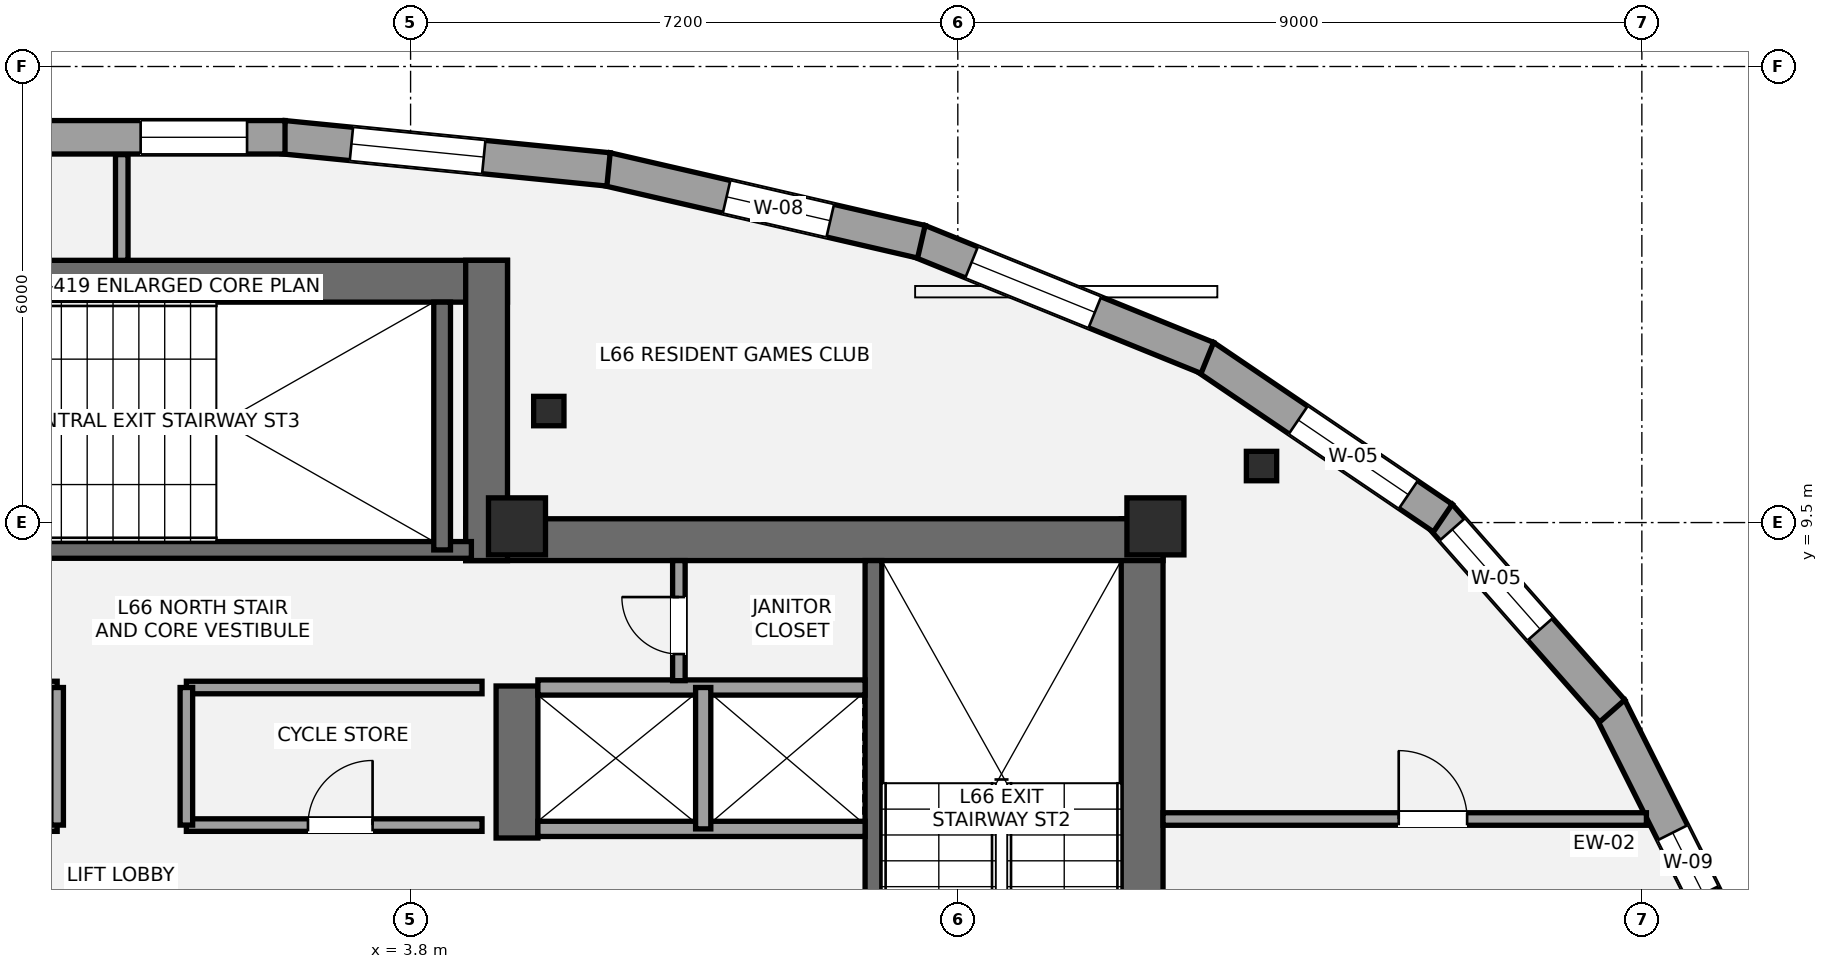
"""IFC4 building model, lengths in metres.
Left out: names, types, materials, properties, quantities, classifications, styles, units other than length and angle.
Written with IfcOpenShell. Run it as: python <this file> out.ifc"""

import sys

from ifc_helpers import new_model, si_unit, direction, frame, frame_2d, origin, origin_2d, place, context, subcontext, project, spatial, rectangle, i_section, extrude, element, fill, save


model = new_model("IFC4")
c1 = context("Model", 3, precision=1e-05, world=origin(), true_north=direction((0.0, 1.0)))
c2 = subcontext(c1, "Body", "Model", "MODEL_VIEW")
j1 = project(units=[si_unit("LENGTHUNIT", "METRE"), si_unit("PLANEANGLEUNIT", "RADIAN")], contexts=[c1])
p1 = place(None, origin())
s1 = spatial("IfcSite", under=j1, at=p1, CompositionType="ELEMENT")
p2 = place(p1, origin())
s2 = spatial("IfcBuilding", under=s1, at=p2, CompositionType="ELEMENT")
p3 = place(p2, frame((0.0, 0.0, 235.2)))
s3 = spatial("IfcBuildingStorey", under=s2, at=p3, CompositionType="ELEMENT", Elevation=235.2)
p4 = place(p3, frame((13.425, 1.3, 0.0), z_axis=(0.0, 0.0, 1.0), x_axis=(0.0, 1.0, 0.0)))
e1 = element("IfcWall", 1, at=p4, inside=s3, PredefinedType="SHEAR", context=c2, shape_type="SweptSolid", body=[
    extrude(rectangle(XDim=8.25, YDim=0.55, at=frame_2d((4.125, 0.0))), origin(), (0.0, 0.0, 1.0), 3.15),
])
p5 = place(p3, frame((4.525, 9.275, 0.0), z_axis=(0.0, 0.0, 1.0), x_axis=(1.0, 0.0, 0.0)))
e2 = element("IfcWall", 2, at=p5, inside=s3, PredefinedType="SHEAR", context=c2, shape_type="SweptSolid", body=[
    extrude(rectangle(XDim=9.175, YDim=0.55, at=frame_2d((4.587, 0.0))), origin(), (0.0, 0.0, 1.0), 3.15),
])
p6 = place(p3, frame((5.2, 5.35, 0.0), z_axis=(0.0, 0.0, 1.0), x_axis=(0.0, 1.0, 0.0)))
e3 = element("IfcWall", 3, at=p6, inside=s3, PredefinedType="SHEAR", context=c2, shape_type="SweptSolid", body=[
    extrude(rectangle(XDim=2.0, YDim=0.55, at=frame_2d((1.0, 0.0))), origin(), (0.0, 0.0, 1.0), 3.15),
])
p7 = place(p3, frame((9.89, 1.85, 0.0), z_axis=(0.0, 0.0, 1.0), x_axis=(0.0, 1.0, 0.0)))
e4 = element("IfcWall", 4, at=p7, inside=s3, PredefinedType="SHEAR", context=c2, shape_type="SweptSolid", body=[
    extrude(rectangle(XDim=7.15, YDim=0.22, at=frame_2d((3.575, 0.0))), origin(), (0.0, 0.0, 1.0), 3.15),
])
p8 = place(p3, frame((-5.075, 12.675, 0.0), z_axis=(0.0, 0.0, 1.0), x_axis=(1.0, 0.0, 0.0)))
e5 = element("IfcWall", 5, at=p8, inside=s3, PredefinedType="SHEAR", context=c2, shape_type="SweptSolid", body=[
    extrude(rectangle(XDim=10.15, YDim=0.55, at=frame_2d((5.075, 0.0))), origin(), (0.0, 0.0, 1.0), 3.15),
])
p9 = place(p3, frame((4.8, 9.0, 0.0), z_axis=(0.0, 0.0, 1.0), x_axis=(0.0, 1.0, 0.0)))
e6 = element("IfcWall", 6, at=p9, inside=s3, PredefinedType="SHEAR", context=c2, shape_type="SweptSolid", body=[
    extrude(rectangle(XDim=3.95, YDim=0.55, at=frame_2d((1.975, 0.0))), origin(), (0.0, 0.0, 1.0), 3.15),
])
p10 = place(p3, frame((-4.7, 9.14, 0.0), z_axis=(0.0, 0.0, 1.0), x_axis=(1.0, 0.0, 0.0)))
e7 = element("IfcWall", 7, at=p10, inside=s3, PredefinedType="SHEAR", context=c2, shape_type="SweptSolid", body=[
    extrude(rectangle(XDim=9.3, YDim=0.22, at=frame_2d((4.65, 0.0))), origin(), (0.0, 0.0, 1.0), 3.15),
])
p11 = place(p10, frame((1.15, 0.0, 0.0)))
e8 = element("IfcOpeningElement", 8, at=p11, cuts=e7, PredefinedType="OPENING", context=c2, shape_type="SweptSolid", body=[
    extrude(rectangle(XDim=1.05, YDim=2.15, at=frame_2d((0.525, 1.075))), frame((0.0, 0.12, 0.0), z_axis=(0.0, -1.0, 0.0), x_axis=(1.0, 0.0, 0.0)), (0.0, 0.0, 1.0), 0.24),
])
p12 = place(p3, frame((4.215, 9.14, 0.0), z_axis=(0.0, 0.0, 1.0), x_axis=(0.0, 1.0, 0.0)))
e9 = element("IfcWall", 9, at=p12, inside=s3, PredefinedType="SHEAR", context=c2, shape_type="SweptSolid", body=[
    extrude(rectangle(XDim=3.26, YDim=0.22, at=frame_2d((1.63, 0.0))), origin(), (0.0, 0.0, 1.0), 3.15),
])
for number, where, z_axis, x_axis in (
    (10, (5.2, 9.45, 0.0), (0.0, 0.0, 1.0), (1.0, 0.0, 0.0)),
    (11, (13.6, 9.45, 0.0), (0.0, 0.0, 1.0), (1.0, 0.0, 0.0)),
):
    element("IfcColumn", number, at=place(p3, frame(where, z_axis=z_axis, x_axis=x_axis)), inside=s3, PredefinedType="PILASTER", context=c2, shape_type="SweptSolid", body=[
        extrude(rectangle(XDim=0.75, YDim=0.75, at=origin_2d()), origin(), (0.0, 0.0, 1.0), 3.15),
    ])
for number, where, z_axis, x_axis in (
    (12, (14.996, 10.244, 0.0), (0.0, 0.0, 1.0), (1.0, 0.0, 0.0)),
    (13, (5.619, 10.967, 0.0), (0.0, 0.0, 1.0), (1.0, 0.0, 0.0)),
):
    element("IfcColumn", number, at=place(p3, frame(where, z_axis=z_axis, x_axis=x_axis)), inside=s3, PredefinedType="COLUMN", context=c2, shape_type="SweptSolid", body=[
        extrude(i_section(OverallWidth=0.399, OverallDepth=0.387, WebThickness=0.021, FlangeThickness=0.033, at=origin_2d()), origin(), (0.0, 0.0, 1.0), 3.15),
    ])
p13 = place(p3, frame((19.578, 7.069, 0.0), z_axis=(0.0, 0.0, 1.0), x_axis=(0.448424724145, -0.893820601002, 0.0)))
e14 = element("IfcWall", 14, at=p13, inside=s3, PredefinedType="STANDARD", context=c2, shape_type="SweptSolid", body=[
    extrude(rectangle(XDim=3.144, YDim=0.44, at=frame_2d((1.572, 0.0))), origin(), (0.0, 0.0, 1.0), 2.336),
])
p14 = place(p13, frame((1.844, 0.0, 0.58)))
e15 = element("IfcOpeningElement", 15, at=p14, cuts=e14, PredefinedType="OPENING", context=c2, shape_type="SweptSolid", body=[
    extrude(rectangle(XDim=0.9, YDim=1.35, at=frame_2d((0.45, 0.675))), frame((0.0, 0.23, 0.0), z_axis=(0.0, -1.0, 0.0), x_axis=(1.0, 0.0, 0.0)), (0.0, 0.0, 1.0), 0.46),
])
p15 = place(p3, frame((17.34, 9.596, 0.0), z_axis=(0.0, 0.0, 1.0), x_axis=(0.66136043846, -0.750068243855, 0.0)))
e16 = element("IfcWall", 16, at=p15, inside=s3, PredefinedType="STANDARD", context=c2, shape_type="SweptSolid", body=[
    extrude(rectangle(XDim=3.432, YDim=0.44, at=frame_2d((1.716, 0.0))), origin(), (0.0, 0.0, 1.0), 2.336),
])
p16 = place(p15, frame((0.249, 0.0, 0.55)))
e17 = element("IfcOpeningElement", 17, at=p16, cuts=e16, PredefinedType="OPENING", context=c2, shape_type="SweptSolid", body=[
    extrude(rectangle(XDim=1.75, YDim=1.55, at=frame_2d((0.875, 0.775))), frame((0.0, 0.23, 0.0), z_axis=(0.0, -1.0, 0.0), x_axis=(1.0, 0.0, 0.0)), (0.0, 0.0, 1.0), 0.46),
])
p17 = place(p3, frame((14.242, 11.688, 0.0), z_axis=(0.0, 0.0, 1.0), x_axis=(0.827637036896, -0.561263694851, 0.0)))
e18 = element("IfcWall", 18, at=p17, inside=s3, PredefinedType="STANDARD", context=c2, shape_type="SweptSolid", body=[
    extrude(rectangle(XDim=3.793, YDim=0.44, at=frame_2d((1.896, 0.0))), origin(), (0.0, 0.0, 1.0), 2.336),
])
p18 = place(p17, frame((1.494, 0.0, 0.55)))
e19 = element("IfcOpeningElement", 19, at=p18, cuts=e18, PredefinedType="OPENING", context=c2, shape_type="SweptSolid", body=[
    extrude(rectangle(XDim=1.75, YDim=1.55, at=frame_2d((0.875, 0.775))), frame((0.0, 0.23, 0.0), z_axis=(0.0, -1.0, 0.0), x_axis=(1.0, 0.0, 0.0)), (0.0, 0.0, 1.0), 0.46),
])
p19 = place(p3, frame((10.487, 13.205, 0.0), z_axis=(0.0, 0.0, 1.0), x_axis=(0.926731976866, -0.375723093586, 0.0)))
e20 = element("IfcWall", 20, at=p19, inside=s3, PredefinedType="STANDARD", context=c2, shape_type="SweptSolid", body=[
    extrude(rectangle(XDim=4.096, YDim=0.44, at=frame_2d((2.048, 0.0))), origin(), (0.0, 0.0, 1.0), 2.336),
])
p20 = place(p19, frame((0.749, 0.0, 0.55)))
e21 = element("IfcOpeningElement", 21, at=p20, cuts=e20, PredefinedType="OPENING", context=c2, shape_type="SweptSolid", body=[
    extrude(rectangle(XDim=1.75, YDim=1.55, at=frame_2d((0.875, 0.775))), frame((0.0, 0.23, 0.0), z_axis=(0.0, -1.0, 0.0), x_axis=(1.0, 0.0, 0.0)), (0.0, 0.0, 1.0), 0.46),
])
p21 = place(p3, frame((6.377, 14.151, 0.0), z_axis=(0.0, 0.0, 1.0), x_axis=(0.974398936081, -0.224825962391, 0.0)))
e22 = element("IfcWall", 22, at=p21, inside=s3, PredefinedType="STANDARD", context=c2, shape_type="SweptSolid", body=[
    extrude(rectangle(XDim=4.252, YDim=0.44, at=frame_2d((2.126, 0.0))), origin(), (0.0, 0.0, 1.0), 2.336),
])
p22 = place(p21, frame((1.622, 0.0, 0.55)))
e23 = element("IfcOpeningElement", 23, at=p22, cuts=e22, PredefinedType="OPENING", context=c2, shape_type="SweptSolid", body=[
    extrude(rectangle(XDim=1.4, YDim=1.55, at=frame_2d((0.7, 0.775))), frame((0.0, 0.23, 0.0), z_axis=(0.0, -1.0, 0.0), x_axis=(1.0, 0.0, 0.0)), (0.0, 0.0, 1.0), 0.46),
])
p23 = place(p3, frame((2.126, 14.57, 0.0), z_axis=(0.0, 0.0, 1.0), x_axis=(0.995134540264, -0.098525361068, 0.0)))
e24 = element("IfcWall", 24, at=p23, inside=s3, PredefinedType="STANDARD", context=c2, shape_type="SweptSolid", body=[
    extrude(rectangle(XDim=4.299, YDim=0.44, at=frame_2d((2.15, 0.0))), origin(), (0.0, 0.0, 1.0), 2.336),
])
p24 = place(p23, frame((0.9, 0.0, 0.55)))
e25 = element("IfcOpeningElement", 25, at=p24, cuts=e24, PredefinedType="OPENING", context=c2, shape_type="SweptSolid", body=[
    extrude(rectangle(XDim=1.75, YDim=1.55, at=frame_2d((0.875, 0.775))), frame((0.0, 0.23, 0.0), z_axis=(0.0, -1.0, 0.0), x_axis=(1.0, 0.0, 0.0)), (0.0, 0.0, 1.0), 0.46),
])
p25 = place(p3, frame((-2.148, 14.569, 0.0), z_axis=(0.0, 0.0, 1.0), x_axis=(1.0, 0.0, 0.0)))
e26 = element("IfcWall", 26, at=p25, inside=s3, PredefinedType="STANDARD", context=c2, shape_type="SweptSolid", body=[
    extrude(rectangle(XDim=4.296, YDim=0.44, at=frame_2d((2.148, 0.0))), origin(), (0.0, 0.0, 1.0), 2.336),
])
p26 = place(p25, frame((2.396, 0.0, 0.58)))
e27 = element("IfcOpeningElement", 27, at=p26, cuts=e26, PredefinedType="OPENING", context=c2, shape_type="SweptSolid", body=[
    extrude(rectangle(XDim=1.4, YDim=1.55, at=frame_2d((0.7, 0.775))), frame((0.0, 0.23, 0.0), z_axis=(0.0, -1.0, 0.0), x_axis=(1.0, 0.0, 0.0)), (0.0, 0.0, 1.0), 0.46),
])
for number, where, z_axis, x_axis in (
    (28, (5.475, 5.47, 0.0), (0.0, 0.0, 1.0), (1.0, 0.0, 0.0)),
    (29, (5.475, 7.33, 0.0), (0.0, 0.0, 1.0), (1.0, 0.0, 0.0)),
):
    element("IfcWall", number, at=place(p3, frame(where, z_axis=z_axis, x_axis=x_axis)), inside=s3, PredefinedType="SOLIDWALL", context=c2, shape_type="SweptSolid", body=[
        extrude(rectangle(XDim=4.305, YDim=0.2, at=frame_2d((2.152, 0.0))), origin(), (0.0, 0.0, 1.0), 2.97),
    ])
p27 = place(p3, frame((7.65, 5.47, 0.0), z_axis=(0.0, 0.0, 1.0), x_axis=(0.0, 1.0, 0.0)))
e30 = element("IfcWall", 30, at=p27, inside=s3, PredefinedType="SOLIDWALL", context=c2, shape_type="SweptSolid", body=[
    extrude(rectangle(XDim=1.86, YDim=0.2, at=frame_2d((0.93, 0.0))), origin(), (0.0, 0.0, 1.0), 2.97),
])
p28 = place(p3, frame((-4.74, 5.52, 0.0), z_axis=(0.0, 0.0, 1.0), x_axis=(1.0, 0.0, 0.0)))
e31 = element("IfcWall", 31, at=p28, inside=s3, PredefinedType="PARTITIONING", context=c2, shape_type="SweptSolid", body=[
    extrude(rectangle(XDim=3.89, YDim=0.165, at=frame_2d((1.945, 0.0))), origin(), (0.0, 0.0, 1.0), 2.97),
])
p29 = place(p28, frame((1.6, 0.0, 0.0)))
e32 = element("IfcOpeningElement", 32, at=p29, cuts=e31, PredefinedType="OPENING", context=c2, shape_type="SweptSolid", body=[
    extrude(rectangle(XDim=0.85, YDim=2.1, at=frame_2d((0.425, 1.05))), frame((0.0, 0.093, 0.0), z_axis=(0.0, -1.0, 0.0), x_axis=(1.0, 0.0, 0.0)), (0.0, 0.0, 1.0), 0.185),
])
p30 = place(p3, frame((-4.74, 7.33, 0.0), z_axis=(0.0, 0.0, 1.0), x_axis=(1.0, 0.0, 0.0)))
e33 = element("IfcWall", 33, at=p30, inside=s3, PredefinedType="PARTITIONING", context=c2, shape_type="SweptSolid", body=[
    extrude(rectangle(XDim=3.89, YDim=0.165, at=frame_2d((1.945, 0.0))), origin(), (0.0, 0.0, 1.0), 2.97),
])
p31 = place(p3, frame((-0.85, 5.52, 0.0), z_axis=(0.0, 0.0, 1.0), x_axis=(0.0, 1.0, 0.0)))
e34 = element("IfcWall", 34, at=p31, inside=s3, PredefinedType="PARTITIONING", context=c2, shape_type="SweptSolid", body=[
    extrude(rectangle(XDim=1.81, YDim=0.165, at=frame_2d((0.905, 0.0))), origin(), (0.0, 0.0, 1.0), 2.97),
])
p32 = place(p3, frame((0.85, 5.52, 0.0), z_axis=(0.0, 0.0, 1.0), x_axis=(1.0, 0.0, 0.0)))
e35 = element("IfcWall", 35, at=p32, inside=s3, PredefinedType="PARTITIONING", context=c2, shape_type="SweptSolid", body=[
    extrude(rectangle(XDim=3.89, YDim=0.165, at=frame_2d((1.945, 0.0))), origin(), (0.0, 0.0, 1.0), 2.97),
])
p33 = place(p32, frame((1.6, 0.0, 0.0)))
e36 = element("IfcOpeningElement", 36, at=p33, cuts=e35, PredefinedType="OPENING", context=c2, shape_type="SweptSolid", body=[
    extrude(rectangle(XDim=0.85, YDim=2.1, at=frame_2d((0.425, 1.05))), frame((0.0, 0.093, 0.0), z_axis=(0.0, -1.0, 0.0), x_axis=(1.0, 0.0, 0.0)), (0.0, 0.0, 1.0), 0.185),
])
p34 = place(p3, frame((0.85, 7.33, 0.0), z_axis=(0.0, 0.0, 1.0), x_axis=(1.0, 0.0, 0.0)))
e37 = element("IfcWall", 37, at=p34, inside=s3, PredefinedType="PARTITIONING", context=c2, shape_type="SweptSolid", body=[
    extrude(rectangle(XDim=3.89, YDim=0.165, at=frame_2d((1.945, 0.0))), origin(), (0.0, 0.0, 1.0), 2.97),
])
p35 = place(p3, frame((0.85, 5.52, 0.0), z_axis=(0.0, 0.0, 1.0), x_axis=(0.0, 1.0, 0.0)))
e38 = element("IfcWall", 38, at=p35, inside=s3, PredefinedType="PARTITIONING", context=c2, shape_type="SweptSolid", body=[
    extrude(rectangle(XDim=1.81, YDim=0.165, at=frame_2d((0.905, 0.0))), origin(), (0.0, 0.0, 1.0), 2.97),
])
p36 = place(p3, frame((7.33, 7.42, 0.0), z_axis=(0.0, 0.0, 1.0), x_axis=(0.0, 1.0, 0.0)))
e39 = element("IfcWall", 39, at=p36, inside=s3, PredefinedType="PARTITIONING", context=c2, shape_type="SweptSolid", body=[
    extrude(rectangle(XDim=1.58, YDim=0.165, at=frame_2d((0.79, 0.0))), origin(), (0.0, 0.0, 1.0), 2.97),
])
p37 = place(p36, frame((0.35, 0.0, 0.0)))
e40 = element("IfcOpeningElement", 40, at=p37, cuts=e39, PredefinedType="OPENING", context=c2, shape_type="SweptSolid", body=[
    extrude(rectangle(XDim=0.75, YDim=2.1, at=frame_2d((0.375, 1.05))), frame((0.0, 0.093, 0.0), z_axis=(0.0, -1.0, 0.0), x_axis=(1.0, 0.0, 0.0)), (0.0, 0.0, 1.0), 0.185),
])
p38 = place(p3, frame((0.0, 12.95, 0.0), z_axis=(0.0, 0.0, 1.0), x_axis=(0.0, 1.0, 0.0)))
e41 = element("IfcWall", 41, at=p38, inside=s3, PredefinedType="PARTITIONING", context=c2, shape_type="SweptSolid", body=[
    extrude(rectangle(XDim=1.391, YDim=0.165, at=frame_2d((0.695, 0.0))), origin(), (0.0, 0.0, 1.0), 2.97),
])
p39 = place(p3, frame((13.7, 5.6, 0.0), z_axis=(0.0, 0.0, 1.0), x_axis=(1.0, 0.0, 0.0)))
e42 = element("IfcWall", 42, at=p39, inside=s3, PredefinedType="PARTITIONING", context=c2, shape_type="SweptSolid", body=[
    extrude(rectangle(XDim=6.36, YDim=0.165, at=frame_2d((3.18, 0.0))), origin(), (0.0, 0.0, 1.0), 2.423),
])
p40 = place(p39, frame((3.101, 0.0, 0.0)))
e43 = element("IfcOpeningElement", 43, at=p40, cuts=e42, PredefinedType="OPENING", context=c2, shape_type="SweptSolid", body=[
    extrude(rectangle(XDim=0.9, YDim=2.1, at=frame_2d((0.45, 1.05))), frame((0.0, 0.093, 0.0), z_axis=(0.0, -1.0, 0.0), x_axis=(1.0, 0.0, 0.0)), (0.0, 0.0, 1.0), 0.185),
])
p41 = place(p14, origin())
e44 = element("IfcWindow", 44, at=p41, inside=s3, PartitioningType="SINGLE_PANEL", PredefinedType="WINDOW", context=c2, shape_type="SweptSolid", body=[
    extrude(rectangle(XDim=0.9, YDim=1.35, at=frame_2d((0.45, 0.675))), frame((0.0, -0.01, 0.0), z_axis=(0.0, -1.0, 0.0), x_axis=(1.0, 0.0, 0.0)), (0.0, 0.0, 1.0), 0.06),
])
fill(e15, e44)
p42 = place(p16, origin())
e45 = element("IfcWindow", 45, at=p42, inside=s3, PartitioningType="SINGLE_PANEL", PredefinedType="WINDOW", context=c2, shape_type="SweptSolid", body=[
    extrude(rectangle(XDim=1.75, YDim=1.55, at=frame_2d((0.875, 0.775))), frame((0.0, -0.01, 0.0), z_axis=(0.0, -1.0, 0.0), x_axis=(1.0, 0.0, 0.0)), (0.0, 0.0, 1.0), 0.06),
])
fill(e17, e45)
p43 = place(p18, origin())
e46 = element("IfcWindow", 46, at=p43, inside=s3, PartitioningType="SINGLE_PANEL", PredefinedType="WINDOW", context=c2, shape_type="SweptSolid", body=[
    extrude(rectangle(XDim=1.75, YDim=1.55, at=frame_2d((0.875, 0.775))), frame((0.0, -0.01, 0.0), z_axis=(0.0, -1.0, 0.0), x_axis=(1.0, 0.0, 0.0)), (0.0, 0.0, 1.0), 0.06),
])
fill(e19, e46)
p44 = place(p20, origin())
e47 = element("IfcWindow", 47, at=p44, inside=s3, PartitioningType="SINGLE_PANEL", PredefinedType="WINDOW", context=c2, shape_type="SweptSolid", body=[
    extrude(rectangle(XDim=1.75, YDim=1.55, at=frame_2d((0.875, 0.775))), frame((0.0, -0.01, 0.0), z_axis=(0.0, -1.0, 0.0), x_axis=(1.0, 0.0, 0.0)), (0.0, 0.0, 1.0), 0.06),
])
fill(e21, e47)
p45 = place(p22, origin())
e48 = element("IfcWindow", 48, at=p45, inside=s3, PartitioningType="SINGLE_PANEL", PredefinedType="WINDOW", context=c2, shape_type="SweptSolid", body=[
    extrude(rectangle(XDim=1.4, YDim=1.55, at=frame_2d((0.7, 0.775))), frame((0.0, -0.01, 0.0), z_axis=(0.0, -1.0, 0.0), x_axis=(1.0, 0.0, 0.0)), (0.0, 0.0, 1.0), 0.06),
])
fill(e23, e48)
p46 = place(p24, origin())
e49 = element("IfcWindow", 49, at=p46, inside=s3, PartitioningType="SINGLE_PANEL", PredefinedType="WINDOW", context=c2, shape_type="SweptSolid", body=[
    extrude(rectangle(XDim=1.75, YDim=1.55, at=frame_2d((0.875, 0.775))), frame((0.0, -0.01, 0.0), z_axis=(0.0, -1.0, 0.0), x_axis=(1.0, 0.0, 0.0)), (0.0, 0.0, 1.0), 0.06),
])
fill(e25, e49)
p47 = place(p26, origin())
e50 = element("IfcWindow", 50, at=p47, inside=s3, PartitioningType="SINGLE_PANEL", PredefinedType="WINDOW", context=c2, shape_type="SweptSolid", body=[
    extrude(rectangle(XDim=1.4, YDim=1.55, at=frame_2d((0.7, 0.775))), frame((0.0, -0.01, 0.0), z_axis=(0.0, -1.0, 0.0), x_axis=(1.0, 0.0, 0.0)), (0.0, 0.0, 1.0), 0.06),
])
fill(e27, e50)
p48 = place(p33, origin())
e51 = element("IfcDoor", 51, at=p48, inside=s3, OperationType="SINGLE_SWING_RIGHT", PredefinedType="DOOR", context=c2, shape_type="SweptSolid", body=[
    extrude(rectangle(XDim=0.85, YDim=2.1, at=frame_2d((0.425, 1.05))), frame((0.0, 0.025, 0.0), z_axis=(0.0, -1.0, 0.0), x_axis=(1.0, 0.0, 0.0)), (0.0, 0.0, 1.0), 0.05),
])
fill(e36, e51)
p49 = place(p37, origin())
e52 = element("IfcDoor", 52, at=p49, inside=s3, OperationType="SINGLE_SWING_RIGHT", PredefinedType="DOOR", context=c2, shape_type="SweptSolid", body=[
    extrude(rectangle(XDim=0.75, YDim=2.1, at=frame_2d((0.375, 1.05))), frame((0.0, 0.025, 0.0), z_axis=(0.0, -1.0, 0.0), x_axis=(1.0, 0.0, 0.0)), (0.0, 0.0, 1.0), 0.05),
])
fill(e40, e52)
p50 = place(p40, origin())
e53 = element("IfcDoor", 53, at=p50, inside=s3, OperationType="SINGLE_SWING_LEFT", PredefinedType="DOOR", context=c2, shape_type="SweptSolid", body=[
    extrude(rectangle(XDim=0.9, YDim=2.1, at=frame_2d((0.45, 1.05))), frame((0.0, 0.025, 0.0), z_axis=(0.0, -1.0, 0.0), x_axis=(1.0, 0.0, 0.0)), (0.0, 0.0, 1.0), 0.05),
])
fill(e43, e53)
save(model, sys.argv[1])
